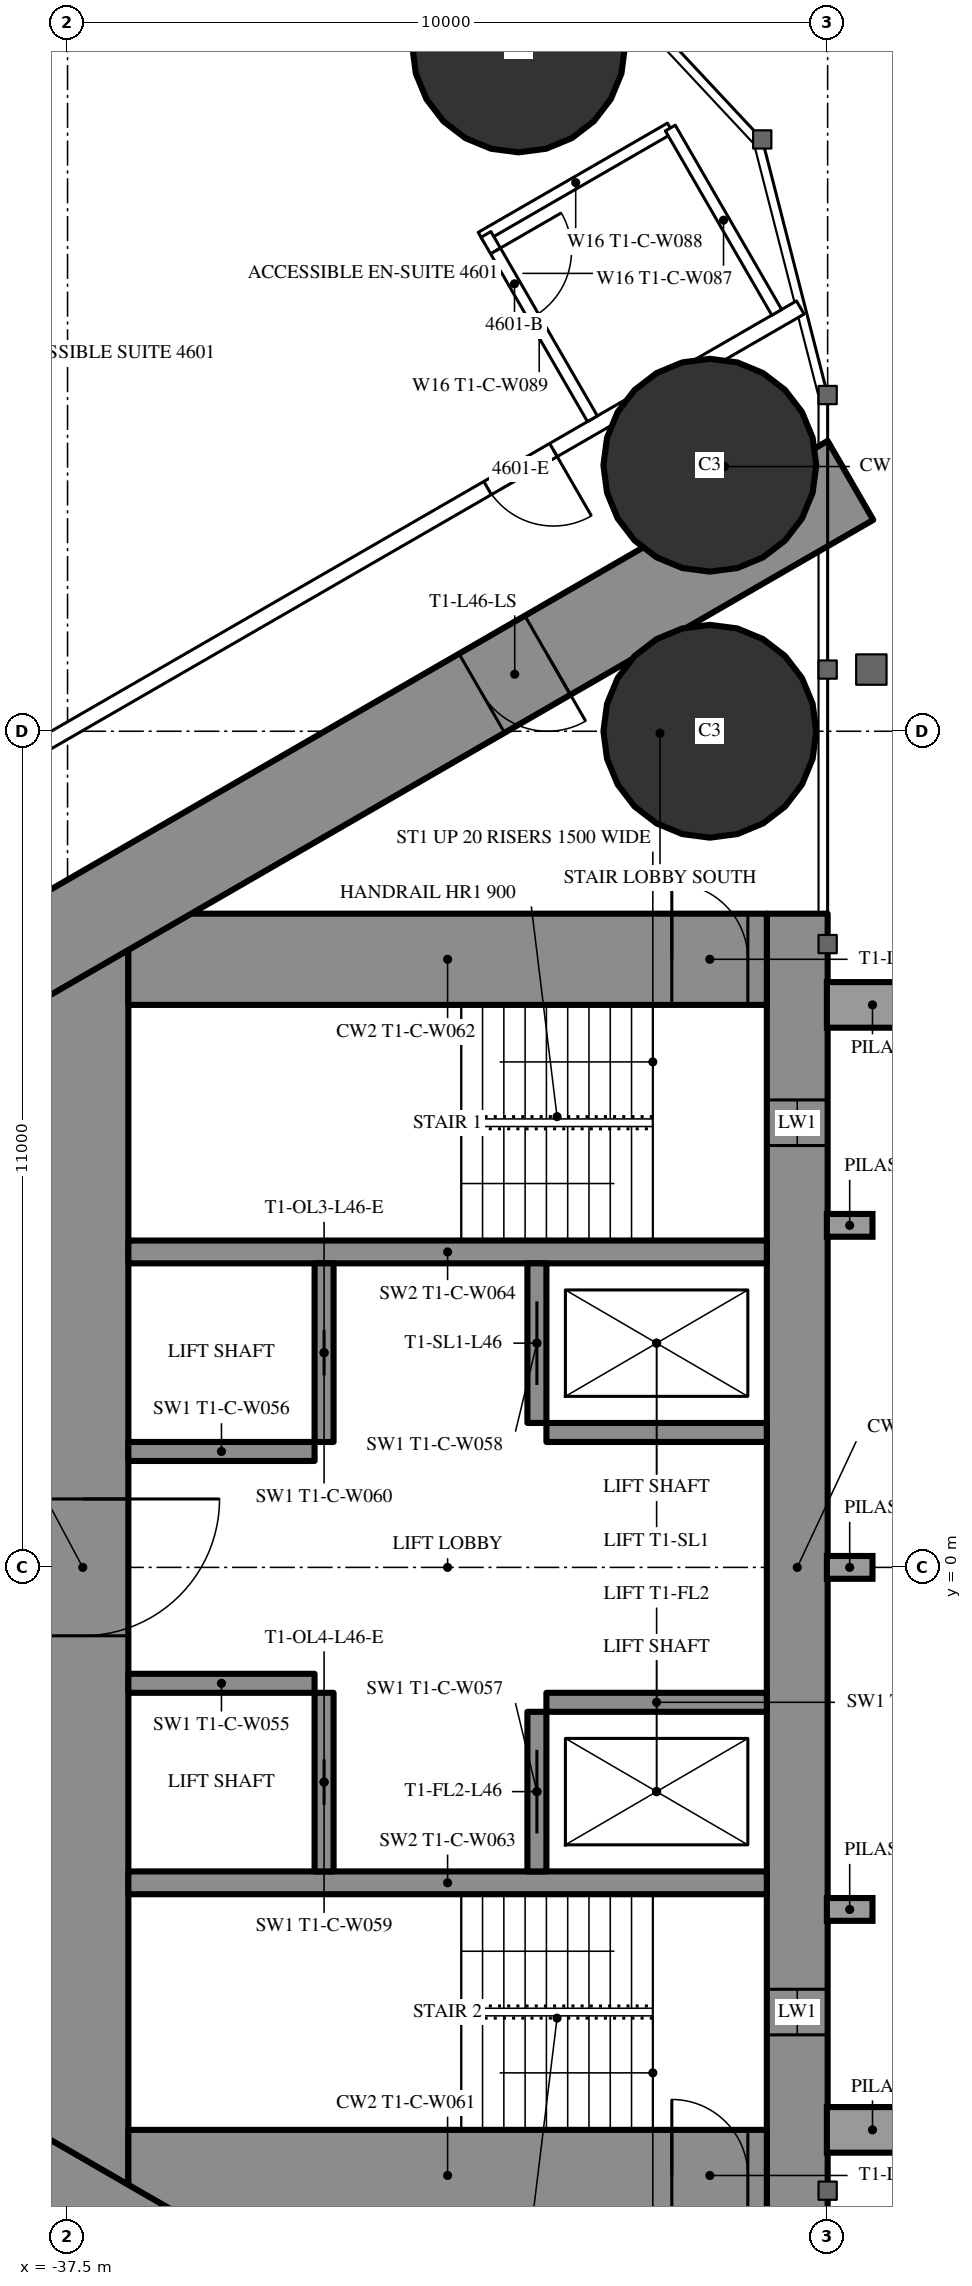
"""IFC4 building model, lengths in metres.
Left out: names, types, materials, properties, quantities, classifications, styles, units other than length and angle.
Written with IfcOpenShell. Run it as: python <this file> out.ifc"""

import sys

from ifc_helpers import new_model, si_unit, direction, frame, frame_2d, origin, origin_2d, place, context, subcontext, project, spatial, rectangle, circle, extrude, element, fill, save


model = new_model("IFC4")
c1 = context("Model", 3, precision=1e-05, world=origin(), true_north=direction((0.0, 1.0)))
c2 = subcontext(c1, "Body", "Model", "MODEL_VIEW")
j1 = project(units=[si_unit("LENGTHUNIT", "METRE"), si_unit("PLANEANGLEUNIT", "RADIAN")], contexts=[c1])
p1 = place(None, origin())
s1 = spatial("IfcSite", under=j1, at=p1, CompositionType="ELEMENT")
p2 = place(p1, origin())
s2 = spatial("IfcBuilding", under=s1, at=p2, CompositionType="ELEMENT")
p3 = place(p2, frame((0.0, 0.0, 173.8)))
s3 = spatial("IfcBuildingStorey", under=s2, at=p3, CompositionType="ELEMENT", Elevation=173.8)
for number, where, z_axis, x_axis in (
    (1, (-31.565, 20.016, 0.0), (0.0, 0.0, 1.0), (1.0, 0.0, 0.0)),
    (2, (-29.05, 11.0, 0.0), (0.0, 0.0, 1.0), (1.0, 0.0, 0.0)),
    (3, (-29.05, 14.5, 0.0), (0.0, 0.0, 1.0), (1.0, 0.0, 0.0)),
):
    element("IfcColumn", number, at=place(p3, frame(where, z_axis=z_axis, x_axis=x_axis)), inside=s3, PredefinedType="COLUMN", context=c2, shape_type="SweptSolid", body=[
        extrude(circle(Radius=1.4, at=origin_2d()), origin(), (0.0, 0.0, 1.0), 3.5),
    ])
p4 = place(p3, frame((-27.9, 8.6, 0.0), z_axis=(0.0, 0.0, 1.0), x_axis=(0.0, -1.0, 0.0)))
e4 = element("IfcWall", 4, at=p4, inside=s3, PredefinedType="SHEAR", context=c2, shape_type="SweptSolid", body=[
    extrude(rectangle(XDim=17.2, YDim=0.8, at=frame_2d((8.6, 0.0))), origin(), (0.0, 0.0, 1.0), 3.5),
])
p5 = place(p4, frame((2.45, 0.0, 0.6)))
e5 = element("IfcOpeningElement", 5, at=p5, cuts=e4, PredefinedType="OPENING", context=c2, shape_type="SweptSolid", body=[
    extrude(rectangle(XDim=0.6, YDim=2.1, at=frame_2d((0.3, 1.05))), frame((0.0, 0.41, 0.0), z_axis=(0.0, -1.0, 0.0), x_axis=(1.0, 0.0, 0.0)), (0.0, 0.0, 1.0), 0.82),
])
p6 = place(p4, frame((14.15, 0.0, 0.6)))
e6 = element("IfcOpeningElement", 6, at=p6, cuts=e4, PredefinedType="OPENING", context=c2, shape_type="SweptSolid", body=[
    extrude(rectangle(XDim=0.6, YDim=2.1, at=frame_2d((0.3, 1.05))), frame((0.0, 0.41, 0.0), z_axis=(0.0, -1.0, 0.0), x_axis=(1.0, 0.0, 0.0)), (0.0, 0.0, 1.0), 0.82),
])
p7 = place(p3, frame((-37.3, 8.6, 0.0), z_axis=(0.0, 0.0, 1.0), x_axis=(0.0, -1.0, 0.0)))
e7 = element("IfcWall", 7, at=p7, inside=s3, PredefinedType="SHEAR", context=c2, shape_type="SweptSolid", body=[
    extrude(rectangle(XDim=17.2, YDim=1.2, at=frame_2d((8.6, 0.0))), origin(), (0.0, 0.0, 1.0), 3.5),
])
p8 = place(p7, frame((7.7, 0.0, 0.0)))
e8 = element("IfcOpeningElement", 8, at=p8, cuts=e7, PredefinedType="OPENING", context=c2, shape_type="SweptSolid", body=[
    extrude(rectangle(XDim=1.8, YDim=2.2, at=frame_2d((0.9, 1.1))), frame((0.0, 0.61, 0.0), z_axis=(0.0, -1.0, 0.0), x_axis=(1.0, 0.0, 0.0)), (0.0, 0.0, 1.0), 1.22),
])
p9 = place(p3, frame((-28.3, 8.0, 0.0), z_axis=(0.0, 0.0, 1.0), x_axis=(-1.0, 0.0, 0.0)))
e9 = element("IfcWall", 9, at=p9, inside=s3, PredefinedType="SHEAR", context=c2, shape_type="SweptSolid", body=[
    extrude(rectangle(XDim=8.4, YDim=1.2, at=frame_2d((4.2, 0.0))), origin(), (0.0, 0.0, 1.0), 3.5),
])
p10 = place(p9, frame((0.25, 0.0, 0.0)))
e10 = element("IfcOpeningElement", 10, at=p10, cuts=e9, PredefinedType="OPENING", context=c2, shape_type="SweptSolid", body=[
    extrude(rectangle(XDim=1.0, YDim=2.2, at=frame_2d((0.5, 1.1))), frame((0.0, 0.61, 0.0), z_axis=(0.0, -1.0, 0.0), x_axis=(1.0, 0.0, 0.0)), (0.0, 0.0, 1.0), 1.22),
])
p11 = place(p3, frame((-28.3, -8.0, 0.0), z_axis=(0.0, 0.0, 1.0), x_axis=(-1.0, 0.0, 0.0)))
e11 = element("IfcWall", 11, at=p11, inside=s3, PredefinedType="SHEAR", context=c2, shape_type="SweptSolid", body=[
    extrude(rectangle(XDim=8.4, YDim=1.2, at=frame_2d((4.2, 0.0))), origin(), (0.0, 0.0, 1.0), 3.5),
])
p12 = place(p11, frame((0.25, 0.0, 0.0)))
e12 = element("IfcOpeningElement", 12, at=p12, cuts=e11, PredefinedType="OPENING", context=c2, shape_type="SweptSolid", body=[
    extrude(rectangle(XDim=1.0, YDim=2.2, at=frame_2d((0.5, 1.1))), frame((0.0, 0.61, 0.0), z_axis=(0.0, -1.0, 0.0), x_axis=(1.0, 0.0, 0.0)), (0.0, 0.0, 1.0), 1.22),
])
for number, where, z_axis, x_axis in (
    (13, (-28.3, 4.15, 0.0), (0.0, 0.0, 1.0), (-1.0, 0.0, 0.0)),
    (14, (-28.3, -4.15, 0.0), (0.0, 0.0, 1.0), (-1.0, 0.0, 0.0)),
):
    element("IfcWall", number, at=place(p3, frame(where, z_axis=z_axis, x_axis=x_axis)), inside=s3, PredefinedType="SHEAR", context=c2, shape_type="SweptSolid", body=[
        extrude(rectangle(XDim=8.4, YDim=0.3, at=frame_2d((4.2, 0.0))), origin(), (0.0, 0.0, 1.0), 3.5),
    ])
p13 = place(p3, frame((-31.325, 4.0, 0.0), z_axis=(0.0, 0.0, 1.0), x_axis=(0.0, -1.0, 0.0)))
e15 = element("IfcWall", 15, at=p13, inside=s3, PredefinedType="SHEAR", context=c2, shape_type="SweptSolid", body=[
    extrude(rectangle(XDim=2.1, YDim=0.25, at=frame_2d((1.05, 0.0))), origin(), (0.0, 0.0, 1.0), 3.5),
])
p14 = place(p13, frame((0.5, 0.0, 0.0)))
e16 = element("IfcOpeningElement", 16, at=p14, cuts=e15, PredefinedType="OPENING", context=c2, shape_type="SweptSolid", body=[
    extrude(rectangle(XDim=1.1, YDim=2.2, at=frame_2d((0.55, 1.1))), frame((0.0, 0.135, 0.0), z_axis=(0.0, -1.0, 0.0), x_axis=(1.0, 0.0, 0.0)), (0.0, 0.0, 1.0), 0.27),
])
p15 = place(p3, frame((-34.125, 4.0, 0.0), z_axis=(0.0, 0.0, 1.0), x_axis=(0.0, -1.0, 0.0)))
e17 = element("IfcWall", 17, at=p15, inside=s3, PredefinedType="SHEAR", context=c2, shape_type="SweptSolid", body=[
    extrude(rectangle(XDim=2.35, YDim=0.25, at=frame_2d((1.175, 0.0))), origin(), (0.0, 0.0, 1.0), 3.5),
])
p16 = place(p15, frame((0.875, 0.0, 0.0)))
e18 = element("IfcOpeningElement", 18, at=p16, cuts=e17, PredefinedType="OPENING", context=c2, shape_type="SweptSolid", body=[
    extrude(rectangle(XDim=0.6, YDim=2.0, at=frame_2d((0.3, 1.0))), frame((0.0, 0.135, 0.0), z_axis=(0.0, -1.0, 0.0), x_axis=(1.0, 0.0, 0.0)), (0.0, 0.0, 1.0), 0.27),
])
p17 = place(p3, frame((-28.3, 1.775, 0.0), z_axis=(0.0, 0.0, 1.0), x_axis=(-1.0, 0.0, 0.0)))
e19 = element("IfcWall", 19, at=p17, inside=s3, PredefinedType="SHEAR", context=c2, shape_type="SweptSolid", body=[
    extrude(rectangle(XDim=2.9, YDim=0.25, at=frame_2d((1.45, 0.0))), origin(), (0.0, 0.0, 1.0), 3.5),
])
p18 = place(p3, frame((-34.25, 1.525, 0.0), z_axis=(0.0, 0.0, 1.0), x_axis=(-1.0, 0.0, 0.0)))
e20 = element("IfcWall", 20, at=p18, inside=s3, PredefinedType="SHEAR", context=c2, shape_type="SweptSolid", body=[
    extrude(rectangle(XDim=2.45, YDim=0.25, at=frame_2d((1.225, 0.0))), origin(), (0.0, 0.0, 1.0), 3.5),
])
p19 = place(p3, frame((-31.325, -1.9, 0.0), z_axis=(0.0, 0.0, 1.0), x_axis=(0.0, -1.0, 0.0)))
e21 = element("IfcWall", 21, at=p19, inside=s3, PredefinedType="SHEAR", context=c2, shape_type="SweptSolid", body=[
    extrude(rectangle(XDim=2.1, YDim=0.25, at=frame_2d((1.05, 0.0))), origin(), (0.0, 0.0, 1.0), 3.5),
])
p20 = place(p19, frame((0.5, 0.0, 0.0)))
e22 = element("IfcOpeningElement", 22, at=p20, cuts=e21, PredefinedType="OPENING", context=c2, shape_type="SweptSolid", body=[
    extrude(rectangle(XDim=1.1, YDim=2.2, at=frame_2d((0.55, 1.1))), frame((0.0, 0.135, 0.0), z_axis=(0.0, -1.0, 0.0), x_axis=(1.0, 0.0, 0.0)), (0.0, 0.0, 1.0), 0.27),
])
p21 = place(p3, frame((-34.125, -1.65, 0.0), z_axis=(0.0, 0.0, 1.0), x_axis=(0.0, -1.0, 0.0)))
e23 = element("IfcWall", 23, at=p21, inside=s3, PredefinedType="SHEAR", context=c2, shape_type="SweptSolid", body=[
    extrude(rectangle(XDim=2.35, YDim=0.25, at=frame_2d((1.175, 0.0))), origin(), (0.0, 0.0, 1.0), 3.5),
])
p22 = place(p21, frame((0.875, 0.0, 0.0)))
e24 = element("IfcOpeningElement", 24, at=p22, cuts=e23, PredefinedType="OPENING", context=c2, shape_type="SweptSolid", body=[
    extrude(rectangle(XDim=0.6, YDim=2.0, at=frame_2d((0.3, 1.0))), frame((0.0, 0.135, 0.0), z_axis=(0.0, -1.0, 0.0), x_axis=(1.0, 0.0, 0.0)), (0.0, 0.0, 1.0), 0.27),
])
p23 = place(p3, frame((-28.3, -1.775, 0.0), z_axis=(0.0, 0.0, 1.0), x_axis=(-1.0, 0.0, 0.0)))
e25 = element("IfcWall", 25, at=p23, inside=s3, PredefinedType="SHEAR", context=c2, shape_type="SweptSolid", body=[
    extrude(rectangle(XDim=2.9, YDim=0.25, at=frame_2d((1.45, 0.0))), origin(), (0.0, 0.0, 1.0), 3.5),
])
p24 = place(p3, frame((-34.25, -1.525, 0.0), z_axis=(0.0, 0.0, 1.0), x_axis=(-1.0, 0.0, 0.0)))
e26 = element("IfcWall", 26, at=p24, inside=s3, PredefinedType="SHEAR", context=c2, shape_type="SweptSolid", body=[
    extrude(rectangle(XDim=2.45, YDim=0.25, at=frame_2d((1.225, 0.0))), origin(), (0.0, 0.0, 1.0), 3.5),
])
p25 = place(p3, frame((-27.2, 14.3, 0.0), z_axis=(0.0, 0.0, 1.0), x_axis=(-0.866026593062, -0.499997940104, 0.0)))
e27 = element("IfcWall", 27, at=p25, inside=s3, PredefinedType="SHEAR", context=c2, shape_type="SweptSolid", body=[
    extrude(rectangle(XDim=28.946, YDim=1.2, at=frame_2d((14.473, 0.0))), origin(), (0.0, 0.0, 1.0), 3.5),
])
p26 = place(p25, frame((4.6, 0.0, 0.0)))
e28 = element("IfcOpeningElement", 28, at=p26, cuts=e27, PredefinedType="OPENING", context=c2, shape_type="SweptSolid", body=[
    extrude(rectangle(XDim=1.0, YDim=2.2, at=frame_2d((0.5, 1.1))), frame((0.0, 0.61, 0.0), z_axis=(0.0, -1.0, 0.0), x_axis=(1.0, 0.0, 0.0)), (0.0, 0.0, 1.0), 1.22),
])
p27 = place(p25, frame((13.395, 0.0, 0.0)))
e29 = element("IfcOpeningElement", 29, at=p27, cuts=e27, PredefinedType="OPENING", context=c2, shape_type="SweptSolid", body=[
    extrude(rectangle(XDim=1.8, YDim=2.2, at=frame_2d((0.9, 1.1))), frame((0.0, 0.61, 0.0), z_axis=(0.0, -1.0, 0.0), x_axis=(1.0, 0.0, 0.0)), (0.0, 0.0, 1.0), 1.22),
])
p28 = place(p3, frame((-27.2, -14.3, 0.0), z_axis=(0.0, 0.0, 1.0), x_axis=(-0.866024021859, 0.500002393557, 0.0)))
e30 = element("IfcWall", 30, at=p28, inside=s3, PredefinedType="SHEAR", context=c2, shape_type="SweptSolid", body=[
    extrude(rectangle(XDim=27.907, YDim=1.2, at=frame_2d((13.954, 0.0))), origin(), (0.0, 0.0, 1.0), 3.5),
])
p29 = place(p28, frame((4.6, 0.0, 0.0)))
e31 = element("IfcOpeningElement", 31, at=p29, cuts=e30, PredefinedType="OPENING", context=c2, shape_type="SweptSolid", body=[
    extrude(rectangle(XDim=1.0, YDim=2.2, at=frame_2d((0.5, 1.1))), frame((0.0, 0.61, 0.0), z_axis=(0.0, -1.0, 0.0), x_axis=(1.0, 0.0, 0.0)), (0.0, 0.0, 1.0), 1.22),
])
p30 = place(p28, frame((13.395, 0.0, 0.0)))
e32 = element("IfcOpeningElement", 32, at=p30, cuts=e30, PredefinedType="OPENING", context=c2, shape_type="SweptSolid", body=[
    extrude(rectangle(XDim=1.8, YDim=2.2, at=frame_2d((0.9, 1.1))), frame((0.0, 0.61, 0.0), z_axis=(0.0, -1.0, 0.0), x_axis=(1.0, 0.0, 0.0)), (0.0, 0.0, 1.0), 1.22),
])
p31 = place(p3, frame((-27.86, 16.575, 0.0), z_axis=(0.0, 0.0, 1.0), x_axis=(-0.866025533911, -0.499999774615, 0.0)))
e33 = element("IfcWall", 33, at=p31, inside=s3, PredefinedType="PARTITIONING", context=c2, shape_type="SweptSolid", body=[
    extrude(rectangle(XDim=33.149, YDim=0.2, at=frame_2d((16.575, 0.0))), origin(), (0.0, 0.0, 1.0), 3.25),
])
p32 = place(p31, frame((3.75, 0.0, 0.0)))
e34 = element("IfcOpeningElement", 34, at=p32, cuts=e33, PredefinedType="OPENING", context=c2, shape_type="SweptSolid", body=[
    extrude(rectangle(XDim=1.0, YDim=2.2, at=frame_2d((0.5, 1.1))), frame((0.0, 0.11, 0.0), z_axis=(0.0, -1.0, 0.0), x_axis=(1.0, 0.0, 0.0)), (0.0, 0.0, 1.0), 0.22),
])
p33 = place(p31, frame((20.347, 0.0, 0.0)))
e35 = element("IfcOpeningElement", 35, at=p33, cuts=e33, PredefinedType="OPENING", context=c2, shape_type="SweptSolid", body=[
    extrude(rectangle(XDim=0.95, YDim=2.2, at=frame_2d((0.475, 1.1))), frame((0.0, 0.11, 0.0), z_axis=(0.0, -1.0, 0.0), x_axis=(1.0, 0.0, 0.0)), (0.0, 0.0, 1.0), 0.22),
])
p34 = place(p31, frame((24.397, 0.0, 0.0)))
e36 = element("IfcOpeningElement", 36, at=p34, cuts=e33, PredefinedType="OPENING", context=c2, shape_type="SweptSolid", body=[
    extrude(rectangle(XDim=0.95, YDim=2.2, at=frame_2d((0.475, 1.1))), frame((0.0, 0.11, 0.0), z_axis=(0.0, -1.0, 0.0), x_axis=(1.0, 0.0, 0.0)), (0.0, 0.0, 1.0), 0.22),
])
p35 = place(p31, frame((30.042, 0.0, 0.0)))
e37 = element("IfcOpeningElement", 37, at=p35, cuts=e33, PredefinedType="OPENING", context=c2, shape_type="SweptSolid", body=[
    extrude(rectangle(XDim=0.95, YDim=2.2, at=frame_2d((0.475, 1.1))), frame((0.0, 0.11, 0.0), z_axis=(0.0, -1.0, 0.0), x_axis=(1.0, 0.0, 0.0)), (0.0, 0.0, 1.0), 0.22),
])
p36 = place(p3, frame((-29.57, 18.936, 0.0), z_axis=(0.0, 0.0, 1.0), x_axis=(-0.866018712932, -0.500011588718, 0.0)))
e38 = element("IfcWall", 38, at=p36, inside=s3, PredefinedType="PARTITIONING", context=c2, shape_type="SweptSolid", body=[
    extrude(rectangle(XDim=2.875, YDim=0.15, at=frame_2d((1.438, 0.0))), origin(), (0.0, 0.0, 1.0), 3.25),
])
p37 = place(p3, frame((-30.595, 15.111, 0.0), z_axis=(0.0, 0.0, 1.0), x_axis=(-0.49998411664, 0.866034573852, 0.0)))
e39 = element("IfcWall", 39, at=p37, inside=s3, PredefinedType="PARTITIONING", context=c2, shape_type="SweptSolid", body=[
    extrude(rectangle(XDim=2.8, YDim=0.15, at=frame_2d((1.4, 0.0))), origin(), (0.0, 0.0, 1.0), 3.25),
])
p38 = place(p37, frame((1.55, 0.0, 0.0)))
e40 = element("IfcOpeningElement", 40, at=p38, cuts=e39, PredefinedType="OPENING", context=c2, shape_type="SweptSolid", body=[
    extrude(rectangle(XDim=1.0, YDim=2.2, at=frame_2d((0.5, 1.1))), frame((0.0, 0.085, 0.0), z_axis=(0.0, -1.0, 0.0), x_axis=(1.0, 0.0, 0.0)), (0.0, 0.0, 1.0), 0.17),
])
p39 = place(p3, frame((-28.17, 16.511, 0.0), z_axis=(0.0, 0.0, 1.0), x_axis=(-0.49994636267, 0.866056369097, 0.0)))
e41 = element("IfcWall", 41, at=p39, inside=s3, PredefinedType="PARTITIONING", context=c2, shape_type="SweptSolid", body=[
    extrude(rectangle(XDim=2.8, YDim=0.15, at=frame_2d((1.4, 0.0))), origin(), (0.0, 0.0, 1.0), 3.25),
])
p40 = place(p38, origin())
e42 = element("IfcDoor", 42, at=p40, inside=s3, OperationType="SINGLE_SWING_RIGHT", PredefinedType="DOOR", context=c2, shape_type="SweptSolid", body=[
    extrude(rectangle(XDim=1.0, YDim=2.2, at=frame_2d((0.5, 1.1))), frame((0.0, 0.025, 0.0), z_axis=(0.0, -1.0, 0.0), x_axis=(1.0, 0.0, 0.0)), (0.0, 0.0, 1.0), 0.05),
])
fill(e40, e42)
p41 = place(p32, origin())
e43 = element("IfcDoor", 43, at=p41, inside=s3, OperationType="SINGLE_SWING_LEFT", PredefinedType="DOOR", context=c2, shape_type="SweptSolid", body=[
    extrude(rectangle(XDim=1.0, YDim=2.2, at=frame_2d((0.5, 1.1))), frame((0.0, 0.025, 0.0), z_axis=(0.0, -1.0, 0.0), x_axis=(1.0, 0.0, 0.0)), (0.0, 0.0, 1.0), 0.05),
])
fill(e34, e43)
p42 = place(p26, origin())
e44 = element("IfcDoor", 44, at=p42, inside=s3, OperationType="SINGLE_SWING_LEFT", PredefinedType="DOOR", context=c2, shape_type="SweptSolid", body=[
    extrude(rectangle(XDim=1.0, YDim=2.2, at=frame_2d((0.5, 1.1))), frame((0.0, 0.025, 0.0), z_axis=(0.0, -1.0, 0.0), x_axis=(1.0, 0.0, 0.0)), (0.0, 0.0, 1.0), 0.05),
])
fill(e28, e44)
p43 = place(p8, origin())
e45 = element("IfcDoor", 45, at=p43, inside=s3, OperationType="DOUBLE_DOOR_SINGLE_SWING", PredefinedType="DOOR", context=c2, shape_type="SweptSolid", body=[
    extrude(rectangle(XDim=1.8, YDim=2.2, at=frame_2d((0.9, 1.1))), frame((0.0, 0.025, 0.0), z_axis=(0.0, -1.0, 0.0), x_axis=(1.0, 0.0, 0.0)), (0.0, 0.0, 1.0), 0.05),
])
fill(e8, e45)
p44 = place(p10, origin())
e46 = element("IfcDoor", 46, at=p44, inside=s3, OperationType="SINGLE_SWING_RIGHT", PredefinedType="DOOR", context=c2, shape_type="SweptSolid", body=[
    extrude(rectangle(XDim=1.0, YDim=2.2, at=frame_2d((0.5, 1.1))), frame((0.0, 0.025, 0.0), z_axis=(0.0, -1.0, 0.0), x_axis=(1.0, 0.0, 0.0)), (0.0, 0.0, 1.0), 0.05),
])
fill(e10, e46)
p45 = place(p12, origin())
e47 = element("IfcDoor", 47, at=p45, inside=s3, OperationType="SINGLE_SWING_RIGHT", PredefinedType="DOOR", context=c2, shape_type="SweptSolid", body=[
    extrude(rectangle(XDim=1.0, YDim=2.2, at=frame_2d((0.5, 1.1))), frame((0.0, 0.025, 0.0), z_axis=(0.0, -1.0, 0.0), x_axis=(1.0, 0.0, 0.0)), (0.0, 0.0, 1.0), 0.05),
])
fill(e12, e47)
p46 = place(p14, origin())
e48 = element("IfcDoor", 48, at=p46, inside=s3, OperationType="SLIDING_TO_LEFT", PredefinedType="USERDEFINED", context=c2, shape_type="SweptSolid", body=[
    extrude(rectangle(XDim=1.1, YDim=2.2, at=frame_2d((0.55, 1.1))), frame((0.0, 0.025, 0.0), z_axis=(0.0, -1.0, 0.0), x_axis=(1.0, 0.0, 0.0)), (0.0, 0.0, 1.0), 0.05),
])
fill(e16, e48)
p47 = place(p20, origin())
e49 = element("IfcDoor", 49, at=p47, inside=s3, OperationType="SLIDING_TO_LEFT", PredefinedType="USERDEFINED", context=c2, shape_type="SweptSolid", body=[
    extrude(rectangle(XDim=1.1, YDim=2.2, at=frame_2d((0.55, 1.1))), frame((0.0, 0.025, 0.0), z_axis=(0.0, -1.0, 0.0), x_axis=(1.0, 0.0, 0.0)), (0.0, 0.0, 1.0), 0.05),
])
fill(e22, e49)
p48 = place(p16, origin())
e50 = element("IfcDoor", 50, at=p48, inside=s3, OperationType="SLIDING_TO_LEFT", PredefinedType="DOOR", context=c2, shape_type="SweptSolid", body=[
    extrude(rectangle(XDim=0.6, YDim=2.0, at=frame_2d((0.3, 1.0))), frame((0.0, 0.025, 0.0), z_axis=(0.0, -1.0, 0.0), x_axis=(1.0, 0.0, 0.0)), (0.0, 0.0, 1.0), 0.05),
])
fill(e18, e50)
p49 = place(p22, origin())
e51 = element("IfcDoor", 51, at=p49, inside=s3, OperationType="SLIDING_TO_LEFT", PredefinedType="DOOR", context=c2, shape_type="SweptSolid", body=[
    extrude(rectangle(XDim=0.6, YDim=2.0, at=frame_2d((0.3, 1.0))), frame((0.0, 0.025, 0.0), z_axis=(0.0, -1.0, 0.0), x_axis=(1.0, 0.0, 0.0)), (0.0, 0.0, 1.0), 0.05),
])
fill(e24, e51)
p50 = place(p5, origin())
e52 = element("IfcWindow", 52, at=p50, inside=s3, PartitioningType="SINGLE_PANEL", PredefinedType="WINDOW", context=c2, shape_type="SweptSolid", body=[
    extrude(rectangle(XDim=0.6, YDim=2.1, at=frame_2d((0.3, 1.05))), frame((0.0, 0.03, 0.0), z_axis=(0.0, -1.0, 0.0), x_axis=(1.0, 0.0, 0.0)), (0.0, 0.0, 1.0), 0.06),
])
fill(e5, e52)
p51 = place(p6, origin())
e53 = element("IfcWindow", 53, at=p51, inside=s3, PartitioningType="SINGLE_PANEL", PredefinedType="WINDOW", context=c2, shape_type="SweptSolid", body=[
    extrude(rectangle(XDim=0.6, YDim=2.1, at=frame_2d((0.3, 1.05))), frame((0.0, 0.03, 0.0), z_axis=(0.0, -1.0, 0.0), x_axis=(1.0, 0.0, 0.0)), (0.0, 0.0, 1.0), 0.06),
])
fill(e6, e53)
save(model, sys.argv[1])
